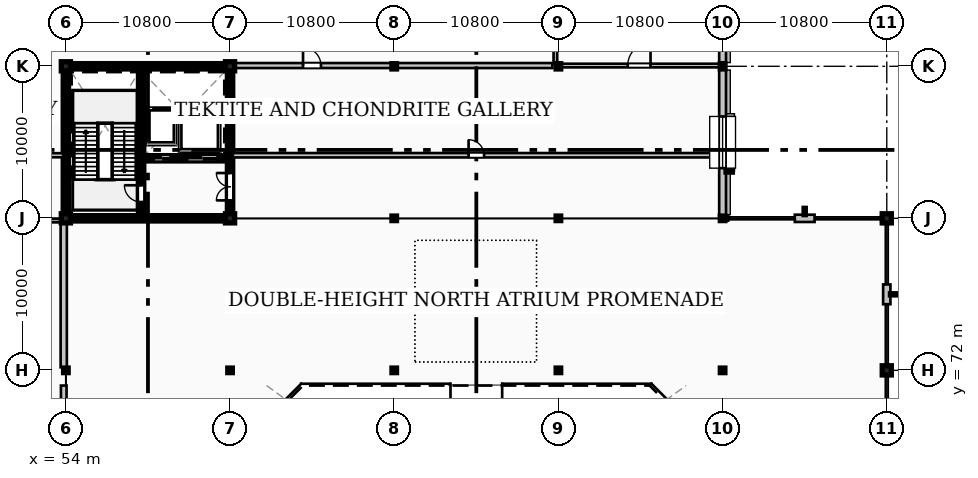
"""IFC4 building model, lengths in metres.
Left out: names, types, materials, properties, quantities, classifications, styles, units other than length and angle.
Written with IfcOpenShell. Run it as: python <this file> out.ifc"""

import sys

from ifc_helpers import new_model, si_unit, direction, frame, frame_2d, origin, origin_2d, place, context, subcontext, project, spatial, rectangle, hollow_rectangle, i_section, extrude, element, fill, save


model = new_model("IFC4")
c1 = context("Model", 3, precision=1e-05, world=origin(), true_north=direction((0.0, 1.0)))
c2 = subcontext(c1, "Body", "Model", "MODEL_VIEW")
j1 = project(units=[si_unit("LENGTHUNIT", "METRE"), si_unit("PLANEANGLEUNIT", "RADIAN")], contexts=[c1])
p1 = place(None, origin())
s1 = spatial("IfcSite", under=j1, at=p1, CompositionType="ELEMENT")
p2 = place(p1, origin())
s2 = spatial("IfcBuilding", under=s1, at=p2, CompositionType="ELEMENT")
p3 = place(p2, frame((0.0, 0.0, 14.4)))
s3 = spatial("IfcBuildingStorey", under=s2, at=p3, CompositionType="ELEMENT", Elevation=14.4)
p4 = place(p3, frame((54.0, 72.0, 0.0), z_axis=(0.0, 0.0, 1.0), x_axis=(1.0, 0.0, 0.0)))
e1 = element("IfcColumn", 1, at=p4, inside=s3, PredefinedType="COLUMN", context=c2, shape_type="SweptSolid", body=[
    extrude(hollow_rectangle(XDim=0.3, YDim=0.3, WallThickness=0.016, InnerFilletRadius=0.016, OuterFilletRadius=0.032, at=origin_2d()), origin(), (0.0, 0.0, 1.0), 9.6),
])
for number, where, z_axis, x_axis in (
    (2, (54.0, 82.0, 0.0), (0.0, 0.0, 1.0), (1.0, 0.0, 0.0)),
    (3, (54.0, 92.0, 0.0), (0.0, 0.0, 1.0), (1.0, 0.0, 0.0)),
):
    element("IfcColumn", number, at=place(p3, frame(where, z_axis=z_axis, x_axis=x_axis)), inside=s3, PredefinedType="COLUMN", context=c2, shape_type="SweptSolid", body=[
        extrude(rectangle(XDim=0.6, YDim=0.6, at=origin_2d()), origin(), (0.0, 0.0, 1.0), 9.6),
    ])
p5 = place(p3, frame((64.8, 72.0, 0.0), z_axis=(0.0, 0.0, 1.0), x_axis=(1.0, 0.0, 0.0)))
e4 = element("IfcColumn", 4, at=p5, inside=s3, PredefinedType="COLUMN", context=c2, shape_type="SweptSolid", body=[
    extrude(hollow_rectangle(XDim=0.3, YDim=0.3, WallThickness=0.016, InnerFilletRadius=0.016, OuterFilletRadius=0.032, at=origin_2d()), origin(), (0.0, 0.0, 1.0), 9.6),
])
for number, where, z_axis, x_axis in (
    (5, (64.8, 82.0, 0.0), (0.0, 0.0, 1.0), (1.0, 0.0, 0.0)),
    (6, (64.8, 92.0, 0.0), (0.0, 0.0, 1.0), (1.0, 0.0, 0.0)),
):
    element("IfcColumn", number, at=place(p3, frame(where, z_axis=z_axis, x_axis=x_axis)), inside=s3, PredefinedType="COLUMN", context=c2, shape_type="SweptSolid", body=[
        extrude(rectangle(XDim=0.6, YDim=0.6, at=origin_2d()), origin(), (0.0, 0.0, 1.0), 9.6),
    ])
for number, where, z_axis, x_axis in (
    (7, (75.6, 72.0, 0.0), (0.0, 0.0, 1.0), (1.0, 0.0, 0.0)),
    (8, (75.6, 82.0, 0.0), (0.0, 0.0, 1.0), (1.0, 0.0, 0.0)),
):
    element("IfcColumn", number, at=place(p3, frame(where, z_axis=z_axis, x_axis=x_axis)), inside=s3, PredefinedType="COLUMN", context=c2, shape_type="SweptSolid", body=[
        extrude(hollow_rectangle(XDim=0.3, YDim=0.3, WallThickness=0.016, InnerFilletRadius=0.016, OuterFilletRadius=0.032, at=origin_2d()), origin(), (0.0, 0.0, 1.0), 9.6),
    ])
p6 = place(p3, frame((75.6, 92.0, 0.0), z_axis=(0.0, 0.0, 1.0), x_axis=(1.0, 0.0, 0.0)))
e9 = element("IfcColumn", 9, at=p6, inside=s3, PredefinedType="COLUMN", context=c2, shape_type="SweptSolid", body=[
    extrude(i_section(OverallWidth=0.3, OverallDepth=0.35, WebThickness=0.01, FlangeThickness=0.018, FilletRadius=0.027, at=origin_2d()), origin(), (0.0, 0.0, 1.0), 9.6),
])
for number, where, z_axis, x_axis in (
    (10, (86.4, 72.0, 0.0), (0.0, 0.0, 1.0), (1.0, 0.0, 0.0)),
    (11, (86.4, 82.0, 0.0), (0.0, 0.0, 1.0), (1.0, 0.0, 0.0)),
):
    element("IfcColumn", number, at=place(p3, frame(where, z_axis=z_axis, x_axis=x_axis)), inside=s3, PredefinedType="COLUMN", context=c2, shape_type="SweptSolid", body=[
        extrude(hollow_rectangle(XDim=0.3, YDim=0.3, WallThickness=0.016, InnerFilletRadius=0.016, OuterFilletRadius=0.032, at=origin_2d()), origin(), (0.0, 0.0, 1.0), 9.6),
    ])
p7 = place(p3, frame((86.4, 92.0, 0.0), z_axis=(0.0, 0.0, 1.0), x_axis=(1.0, 0.0, 0.0)))
e12 = element("IfcColumn", 12, at=p7, inside=s3, PredefinedType="COLUMN", context=c2, shape_type="SweptSolid", body=[
    extrude(i_section(OverallWidth=0.3, OverallDepth=0.35, WebThickness=0.01, FlangeThickness=0.018, FilletRadius=0.027, at=origin_2d()), origin(), (0.0, 0.0, 1.0), 9.6),
])
for number, where, z_axis, x_axis in (
    (13, (97.2, 72.0, 0.0), (0.0, 0.0, 1.0), (1.0, 0.0, 0.0)),
    (14, (97.2, 82.0, 0.0), (0.0, 0.0, 1.0), (1.0, 0.0, 0.0)),
):
    element("IfcColumn", number, at=place(p3, frame(where, z_axis=z_axis, x_axis=x_axis)), inside=s3, PredefinedType="COLUMN", context=c2, shape_type="SweptSolid", body=[
        extrude(hollow_rectangle(XDim=0.3, YDim=0.3, WallThickness=0.016, InnerFilletRadius=0.016, OuterFilletRadius=0.032, at=origin_2d()), origin(), (0.0, 0.0, 1.0), 9.6),
    ])
p8 = place(p3, frame((97.2, 92.0, 0.0), z_axis=(0.0, 0.0, 1.0), x_axis=(1.0, 0.0, 0.0)))
e15 = element("IfcColumn", 15, at=p8, inside=s3, PredefinedType="COLUMN", context=c2, shape_type="SweptSolid", body=[
    extrude(i_section(OverallWidth=0.3, OverallDepth=0.35, WebThickness=0.01, FlangeThickness=0.018, FilletRadius=0.027, at=origin_2d()), origin(), (0.0, 0.0, 1.0), 9.6),
])
for number, where, z_axis, x_axis in (
    (16, (108.0, 72.0, 0.0), (0.0, 0.0, 1.0), (1.0, 0.0, 0.0)),
    (17, (108.0, 82.0, 0.0), (0.0, 0.0, 1.0), (1.0, 0.0, 0.0)),
):
    element("IfcColumn", number, at=place(p3, frame(where, z_axis=z_axis, x_axis=x_axis)), inside=s3, PredefinedType="COLUMN", context=c2, shape_type="SweptSolid", body=[
        extrude(rectangle(XDim=0.6, YDim=0.6, at=origin_2d()), origin(), (0.0, 0.0, 1.0), 9.6),
    ])
p9 = place(p3, frame((108.0, 71.63, 0.0), z_axis=(0.0, 0.0, 1.0), x_axis=(0.0, 1.0, 0.0)))
e18 = element("IfcWall", 18, at=p9, inside=s3, PredefinedType="STANDARD", context=c2, shape_type="SweptSolid", body=[
    extrude(rectangle(XDim=0.225, YDim=0.3, at=frame_2d((0.113, 0.0))), origin(), (0.0, 0.0, 1.0), 9.36),
])
p10 = place(p3, frame((108.0, 76.35, 0.0), z_axis=(0.0, 0.0, 1.0), x_axis=(0.0, 1.0, 0.0)))
e19 = element("IfcWall", 19, at=p10, inside=s3, PredefinedType="STANDARD", context=c2, shape_type="SweptSolid", body=[
    extrude(rectangle(XDim=1.3, YDim=0.48, at=frame_2d((0.65, 0.0))), origin(), (0.0, 0.0, 1.0), 9.36),
])
for number, where, z_axis, x_axis in (
    (20, (108.0, 72.145, 0.0), (0.0, 0.0, 1.0), (0.0, 1.0, 0.0)),
    (21, (108.0, 81.63, 0.0), (0.0, 0.0, 1.0), (0.0, 1.0, 0.0)),
):
    element("IfcWall", number, at=place(p3, frame(where, z_axis=z_axis, x_axis=x_axis)), inside=s3, PredefinedType="STANDARD", context=c2, shape_type="SweptSolid", body=[
        extrude(rectangle(XDim=0.225, YDim=0.3, at=frame_2d((0.113, 0.0))), origin(), (0.0, 0.0, 1.0), 9.36),
    ])
p11 = place(p3, frame((103.25, 82.0, 0.0), z_axis=(0.0, 0.0, 1.0), x_axis=(-1.0, 0.0, 0.0)))
e22 = element("IfcWall", 22, at=p11, inside=s3, PredefinedType="STANDARD", context=c2, shape_type="SweptSolid", body=[
    extrude(rectangle(XDim=1.3, YDim=0.48, at=frame_2d((0.65, 0.0))), origin(), (0.0, 0.0, 1.0), 8.96),
])
for number, where, z_axis, x_axis in (
    (23, (107.855, 82.0, 0.0), (0.0, 0.0, 1.0), (-1.0, 0.0, 0.0)),
    (24, (97.57, 82.0, 0.0), (0.0, 0.0, 1.0), (-1.0, 0.0, 0.0)),
):
    element("IfcWall", number, at=place(p3, frame(where, z_axis=z_axis, x_axis=x_axis)), inside=s3, PredefinedType="STANDARD", context=c2, shape_type="SweptSolid", body=[
        extrude(rectangle(XDim=0.225, YDim=0.3, at=frame_2d((0.113, 0.0))), origin(), (0.0, 0.0, 1.0), 9.36),
    ])
p12 = place(p3, frame((97.2, 82.145, 0.0), z_axis=(0.0, 0.0, 1.0), x_axis=(0.0, 1.0, 0.0)))
e25 = element("IfcWall", 25, at=p12, inside=s3, PredefinedType="STANDARD", context=c2, shape_type="SweptSolid", body=[
    extrude(rectangle(XDim=9.71, YDim=0.45, at=frame_2d((4.855, 0.0))), origin(), (0.0, 0.0, 1.0), 9.36),
])
p13 = place(p12, frame((3.155, 0.0, 1.1)))
e26 = element("IfcOpeningElement", 26, at=p13, cuts=e25, PredefinedType="OPENING", context=c2, shape_type="SweptSolid", body=[
    extrude(rectangle(XDim=3.4, YDim=5.8, at=frame_2d((1.7, 2.9))), frame((0.0, 0.235, 0.0), z_axis=(0.0, -1.0, 0.0), x_axis=(1.0, 0.0, 0.0)), (0.0, 0.0, 1.0), 0.47),
])
p14 = place(p3, frame((97.2, 92.145, 0.0), z_axis=(0.0, 0.0, 1.0), x_axis=(0.0, 1.0, 0.0)))
e27 = element("IfcWall", 27, at=p14, inside=s3, PredefinedType="STANDARD", context=c2, shape_type="SweptSolid", body=[
    extrude(rectangle(XDim=9.71, YDim=0.45, at=frame_2d((4.855, 0.0))), origin(), (0.0, 0.0, 1.0), 9.36),
])
p15 = place(p14, frame((3.155, 0.0, 1.1)))
e28 = element("IfcOpeningElement", 28, at=p15, cuts=e27, PredefinedType="OPENING", context=c2, shape_type="SweptSolid", body=[
    extrude(rectangle(XDim=3.4, YDim=5.8, at=frame_2d((1.7, 2.9))), frame((0.0, 0.235, 0.0), z_axis=(0.0, -1.0, 0.0), x_axis=(1.0, 0.0, 0.0)), (0.0, 0.0, 1.0), 0.47),
])
for number, where, z_axis, x_axis in (
    (29, (54.3, 82.0, 0.0), (0.0, 0.0, 1.0), (1.0, 0.0, 0.0)),
    (30, (54.3, 92.0, 0.0), (0.0, 0.0, 1.0), (1.0, 0.0, 0.0)),
):
    element("IfcWall", number, at=place(p3, frame(where, z_axis=z_axis, x_axis=x_axis)), inside=s3, PredefinedType="SHEAR", context=c2, shape_type="SweptSolid", body=[
        extrude(rectangle(XDim=10.2, YDim=0.35, at=frame_2d((5.1, 0.0))), origin(), (0.0, 0.0, 1.0), 9.36),
    ])
p16 = place(p3, frame((54.0, 82.3, 0.0), z_axis=(0.0, 0.0, 1.0), x_axis=(0.0, 1.0, 0.0)))
e31 = element("IfcWall", 31, at=p16, inside=s3, PredefinedType="SHEAR", context=c2, shape_type="SweptSolid", body=[
    extrude(rectangle(XDim=9.4, YDim=0.35, at=frame_2d((4.7, 0.0))), origin(), (0.0, 0.0, 1.0), 9.36),
])
p17 = place(p3, frame((64.8, 82.3, 0.0), z_axis=(0.0, 0.0, 1.0), x_axis=(0.0, 1.0, 0.0)))
e32 = element("IfcWall", 32, at=p17, inside=s3, PredefinedType="SHEAR", context=c2, shape_type="SweptSolid", body=[
    extrude(rectangle(XDim=9.4, YDim=0.35, at=frame_2d((4.7, 0.0))), origin(), (0.0, 0.0, 1.0), 9.36),
])
p18 = place(p17, frame((0.88, 0.0, 0.0)))
e33 = element("IfcOpeningElement", 33, at=p18, cuts=e32, PredefinedType="OPENING", context=c2, shape_type="SweptSolid", body=[
    extrude(rectangle(XDim=1.8, YDim=2.25, at=frame_2d((0.9, 1.125))), frame((0.0, 0.185, 0.0), z_axis=(0.0, -1.0, 0.0), x_axis=(1.0, 0.0, 0.0)), (0.0, 0.0, 1.0), 0.37),
])
p19 = place(p3, frame((58.95, 82.175, 0.0), z_axis=(0.0, 0.0, 1.0), x_axis=(0.0, 1.0, 0.0)))
e34 = element("IfcWall", 34, at=p19, inside=s3, PredefinedType="SHEAR", context=c2, shape_type="SweptSolid", body=[
    extrude(rectangle(XDim=9.65, YDim=0.35, at=frame_2d((4.825, 0.0))), origin(), (0.0, 0.0, 1.0), 9.36),
])
p20 = place(p19, frame((0.9, 0.0, 0.0)))
e35 = element("IfcOpeningElement", 35, at=p20, cuts=e34, PredefinedType="OPENING", context=c2, shape_type="SweptSolid", body=[
    extrude(rectangle(XDim=1.1, YDim=2.2, at=frame_2d((0.55, 1.1))), frame((0.0, 0.185, 0.0), z_axis=(0.0, -1.0, 0.0), x_axis=(1.0, 0.0, 0.0)), (0.0, 0.0, 1.0), 0.37),
])
p21 = place(p3, frame((59.13, 85.95, 0.0), z_axis=(0.0, 0.0, 1.0), x_axis=(1.0, 0.0, 0.0)))
e36 = element("IfcWall", 36, at=p21, inside=s3, PredefinedType="SHEAR", context=c2, shape_type="SweptSolid", body=[
    extrude(rectangle(XDim=5.49, YDim=0.35, at=frame_2d((2.745, 0.0))), origin(), (0.0, 0.0, 1.0), 9.36),
])
p22 = place(p21, frame((0.65, 0.0, 0.0)))
e37 = element("IfcOpeningElement", 37, at=p22, cuts=e36, PredefinedType="OPENING", context=c2, shape_type="SweptSolid", body=[
    extrude(rectangle(XDim=1.1, YDim=2.2, at=frame_2d((0.55, 1.1))), frame((0.0, 0.185, 0.0), z_axis=(0.0, -1.0, 0.0), x_axis=(1.0, 0.0, 0.0)), (0.0, 0.0, 1.0), 0.37),
])
p23 = place(p21, frame((2.85, 0.0, 0.0)))
e38 = element("IfcOpeningElement", 38, at=p23, cuts=e36, PredefinedType="OPENING", context=c2, shape_type="SweptSolid", body=[
    extrude(rectangle(XDim=2.0, YDim=2.5, at=frame_2d((1.0, 1.25))), frame((0.0, 0.185, 0.0), z_axis=(0.0, -1.0, 0.0), x_axis=(1.0, 0.0, 0.0)), (0.0, 0.0, 1.0), 0.37),
])
p24 = place(p3, frame((43.38, 81.85, 0.0), z_axis=(0.0, 0.0, 1.0), x_axis=(1.0, 0.0, 0.0)))
e39 = element("IfcWall", 39, at=p24, inside=s3, PredefinedType="PARTITIONING", context=c2, shape_type="SweptSolid", body=[
    extrude(rectangle(XDim=10.44, YDim=0.23, at=frame_2d((5.22, 0.0))), origin(), (0.0, 0.0, 1.0), 8.96),
])
p25 = place(p24, frame((3.92, 0.0, 0.0)))
e40 = element("IfcOpeningElement", 40, at=p25, cuts=e39, PredefinedType="OPENING", context=c2, shape_type="SweptSolid", body=[
    extrude(rectangle(XDim=2.6, YDim=2.8, at=frame_2d((1.3, 1.4))), frame((0.0, 0.125, 0.0), z_axis=(0.0, -1.0, 0.0), x_axis=(1.0, 0.0, 0.0)), (0.0, 0.0, 1.0), 0.25),
])
p26 = place(p3, frame((25.6, 86.15, 0.0), z_axis=(0.0, 0.0, 1.0), x_axis=(1.0, 0.0, 0.0)))
e41 = element("IfcWall", 41, at=p26, inside=s3, PredefinedType="PARTITIONING", context=c2, shape_type="SweptSolid", body=[
    extrude(rectangle(XDim=28.22, YDim=0.27, at=frame_2d((14.11, 0.0))), origin(), (0.0, 0.0, 1.0), 9.32),
])
p27 = place(p26, frame((12.76, 0.0, 0.0)))
e42 = element("IfcOpeningElement", 42, at=p27, cuts=e41, PredefinedType="OPENING", context=c2, shape_type="SweptSolid", body=[
    extrude(rectangle(XDim=2.7, YDim=2.85, at=frame_2d((1.35, 1.425))), frame((0.0, 0.145, 0.0), z_axis=(0.0, -1.0, 0.0), x_axis=(1.0, 0.0, 0.0)), (0.0, 0.0, 1.0), 0.29),
])
p28 = place(p3, frame((64.98, 86.15, 0.0), z_axis=(0.0, 0.0, 1.0), x_axis=(1.0, 0.0, 0.0)))
e43 = element("IfcWall", 43, at=p28, inside=s3, PredefinedType="PARTITIONING", context=c2, shape_type="SweptSolid", body=[
    extrude(rectangle(XDim=32.04, YDim=0.29, at=frame_2d((16.02, 0.0))), origin(), (0.0, 0.0, 1.0), 9.32),
])
p29 = place(p28, frame((15.51, 0.0, 0.0)))
e44 = element("IfcOpeningElement", 44, at=p29, cuts=e43, PredefinedType="OPENING", context=c2, shape_type="SweptSolid", body=[
    extrude(rectangle(XDim=1.02, YDim=2.18, at=frame_2d((0.51, 1.09))), frame((0.0, 0.155, 0.0), z_axis=(0.0, -1.0, 0.0), x_axis=(1.0, 0.0, 0.0)), (0.0, 0.0, 1.0), 0.31),
])
p30 = place(p3, frame((64.98, 92.05, 0.0), z_axis=(0.0, 0.0, 1.0), x_axis=(1.0, 0.0, 0.0)))
e45 = element("IfcWall", 45, at=p30, inside=s3, PredefinedType="PARTITIONING", context=c2, shape_type="SweptSolid", body=[
    extrude(rectangle(XDim=10.42, YDim=0.33, at=frame_2d((5.21, 0.0))), origin(), (0.0, 0.0, 1.0), 8.92),
])
p31 = place(p30, frame((4.62, 0.0, 0.0)))
e46 = element("IfcOpeningElement", 46, at=p31, cuts=e45, PredefinedType="OPENING", context=c2, shape_type="SweptSolid", body=[
    extrude(rectangle(XDim=1.18, YDim=2.28, at=frame_2d((0.59, 1.14))), frame((0.0, 0.175, 0.0), z_axis=(0.0, -1.0, 0.0), x_axis=(1.0, 0.0, 0.0)), (0.0, 0.0, 1.0), 0.35),
])
p32 = place(p3, frame((75.8, 92.05, 0.0), z_axis=(0.0, 0.0, 1.0), x_axis=(1.0, 0.0, 0.0)))
e47 = element("IfcWall", 47, at=p32, inside=s3, PredefinedType="PARTITIONING", context=c2, shape_type="SweptSolid", body=[
    extrude(rectangle(XDim=10.2, YDim=0.33, at=frame_2d((5.1, 0.0))), origin(), (0.0, 0.0, 1.0), 8.92),
])
p33 = place(p3, frame((86.4, 92.05, 0.0), z_axis=(0.0, 0.0, 1.0), x_axis=(1.0, 0.0, 0.0)))
e48 = element("IfcWall", 48, at=p33, inside=s3, PredefinedType="SOLIDWALL", context=c2, shape_type="SweptSolid", body=[
    extrude(rectangle(XDim=10.62, YDim=0.24, at=frame_2d((5.31, 0.0))), origin(), (0.0, 0.0, 1.0), 8.91),
])
p34 = place(p33, frame((4.56, 0.0, 0.0)))
e49 = element("IfcOpeningElement", 49, at=p34, cuts=e48, PredefinedType="OPENING", context=c2, shape_type="SweptSolid", body=[
    extrude(rectangle(XDim=1.5, YDim=2.3, at=frame_2d((0.75, 1.15))), frame((0.0, 0.13, 0.0), z_axis=(0.0, -1.0, 0.0), x_axis=(1.0, 0.0, 0.0)), (0.0, 0.0, 1.0), 0.26),
])
p35 = place(p3, frame((53.86, 62.2, 0.0), z_axis=(0.0, 0.0, 1.0), x_axis=(0.0, 1.0, 0.0)))
e50 = element("IfcWall", 50, at=p35, inside=s3, PredefinedType="PARTITIONING", context=c2, shape_type="SweptSolid", body=[
    extrude(rectangle(XDim=8.8, YDim=0.37, at=frame_2d((4.4, 0.0))), origin(), (0.0, 0.0, 1.0), 9.32),
])
p36 = place(p3, frame((53.86, 72.2, 0.0), z_axis=(0.0, 0.0, 1.0), x_axis=(0.0, 1.0, 0.0)))
e51 = element("IfcWall", 51, at=p36, inside=s3, PredefinedType="PARTITIONING", context=c2, shape_type="SweptSolid", body=[
    extrude(rectangle(XDim=9.62, YDim=0.41, at=frame_2d((4.81, 0.0))), origin(), (0.0, 0.0, 1.0), 9.32),
])
p37 = place(p3, frame((86.2, 92.18, 0.0), z_axis=(0.0, 0.0, 1.0), x_axis=(0.0, 1.0, 0.0)))
e52 = element("IfcWall", 52, at=p37, inside=s3, PredefinedType="SOLIDWALL", context=c2, shape_type="SweptSolid", body=[
    extrude(rectangle(XDim=9.62, YDim=0.24, at=frame_2d((4.81, 0.0))), origin(), (0.0, 0.0, 1.0), 9.32),
])
p38 = place(p13, origin())
e53 = element("IfcWindow", 53, at=p38, inside=s3, PartitioningType="SINGLE_PANEL", PredefinedType="WINDOW", context=c2, shape_type="SweptSolid", body=[
    extrude(rectangle(XDim=3.4, YDim=5.8, at=frame_2d((1.7, 2.9))), frame((0.0, 0.03, 0.0), z_axis=(0.0, -1.0, 0.0), x_axis=(1.0, 0.0, 0.0)), (0.0, 0.0, 1.0), 0.06),
])
fill(e26, e53)
p39 = place(p20, origin())
e54 = element("IfcDoor", 54, at=p39, inside=s3, OperationType="SINGLE_SWING_RIGHT", PredefinedType="DOOR", context=c2, shape_type="SweptSolid", body=[
    extrude(rectangle(XDim=1.1, YDim=2.2, at=frame_2d((0.55, 1.1))), frame((0.0, 0.025, 0.0), z_axis=(0.0, -1.0, 0.0), x_axis=(1.0, 0.0, 0.0)), (0.0, 0.0, 1.0), 0.05),
])
fill(e35, e54)
p40 = place(p18, origin())
e55 = element("IfcDoor", 55, at=p40, inside=s3, OperationType="DOUBLE_DOOR_SINGLE_SWING", PredefinedType="DOOR", context=c2, shape_type="SweptSolid", body=[
    extrude(rectangle(XDim=1.8, YDim=2.25, at=frame_2d((0.9, 1.125))), frame((0.0, 0.025, 0.0), z_axis=(0.0, -1.0, 0.0), x_axis=(1.0, 0.0, 0.0)), (0.0, 0.0, 1.0), 0.05),
])
fill(e33, e55)
p41 = place(p22, origin())
e56 = element("IfcDoor", 56, at=p41, inside=s3, OperationType="DOUBLE_DOOR_SLIDING", PredefinedType="DOOR", context=c2, shape_type="SweptSolid", body=[
    extrude(rectangle(XDim=1.1, YDim=2.2, at=frame_2d((0.55, 1.1))), frame((0.0, 0.025, 0.0), z_axis=(0.0, -1.0, 0.0), x_axis=(1.0, 0.0, 0.0)), (0.0, 0.0, 1.0), 0.05),
])
fill(e37, e56)
p42 = place(p23, origin())
e57 = element("IfcDoor", 57, at=p42, inside=s3, OperationType="DOUBLE_DOOR_SLIDING", PredefinedType="DOOR", context=c2, shape_type="SweptSolid", body=[
    extrude(rectangle(XDim=2.0, YDim=2.5, at=frame_2d((1.0, 1.25))), frame((0.0, 0.025, 0.0), z_axis=(0.0, -1.0, 0.0), x_axis=(1.0, 0.0, 0.0)), (0.0, 0.0, 1.0), 0.05),
])
fill(e38, e57)
p43 = place(p29, origin())
e58 = element("IfcDoor", 58, at=p43, inside=s3, OperationType="SINGLE_SWING_LEFT", PredefinedType="DOOR", context=c2, shape_type="SweptSolid", body=[
    extrude(rectangle(XDim=1.02, YDim=2.18, at=frame_2d((0.51, 1.09))), frame((0.0, 0.025, 0.0), z_axis=(0.0, -1.0, 0.0), x_axis=(1.0, 0.0, 0.0)), (0.0, 0.0, 1.0), 0.05),
])
fill(e44, e58)
p44 = place(p31, origin())
e59 = element("IfcDoor", 59, at=p44, inside=s3, OperationType="SINGLE_SWING_LEFT", PredefinedType="DOOR", context=c2, shape_type="SweptSolid", body=[
    extrude(rectangle(XDim=1.18, YDim=2.28, at=frame_2d((0.59, 1.14))), frame((0.0, 0.025, 0.0), z_axis=(0.0, -1.0, 0.0), x_axis=(1.0, 0.0, 0.0)), (0.0, 0.0, 1.0), 0.05),
])
fill(e46, e59)
p45 = place(p34, origin())
e60 = element("IfcDoor", 60, at=p45, inside=s3, OperationType="SINGLE_SWING_RIGHT", PredefinedType="DOOR", context=c2, shape_type="SweptSolid", body=[
    extrude(rectangle(XDim=1.5, YDim=2.3, at=frame_2d((0.75, 1.15))), frame((0.0, 0.025, 0.0), z_axis=(0.0, -1.0, 0.0), x_axis=(1.0, 0.0, 0.0)), (0.0, 0.0, 1.0), 0.05),
])
fill(e49, e60)
save(model, sys.argv[1])
